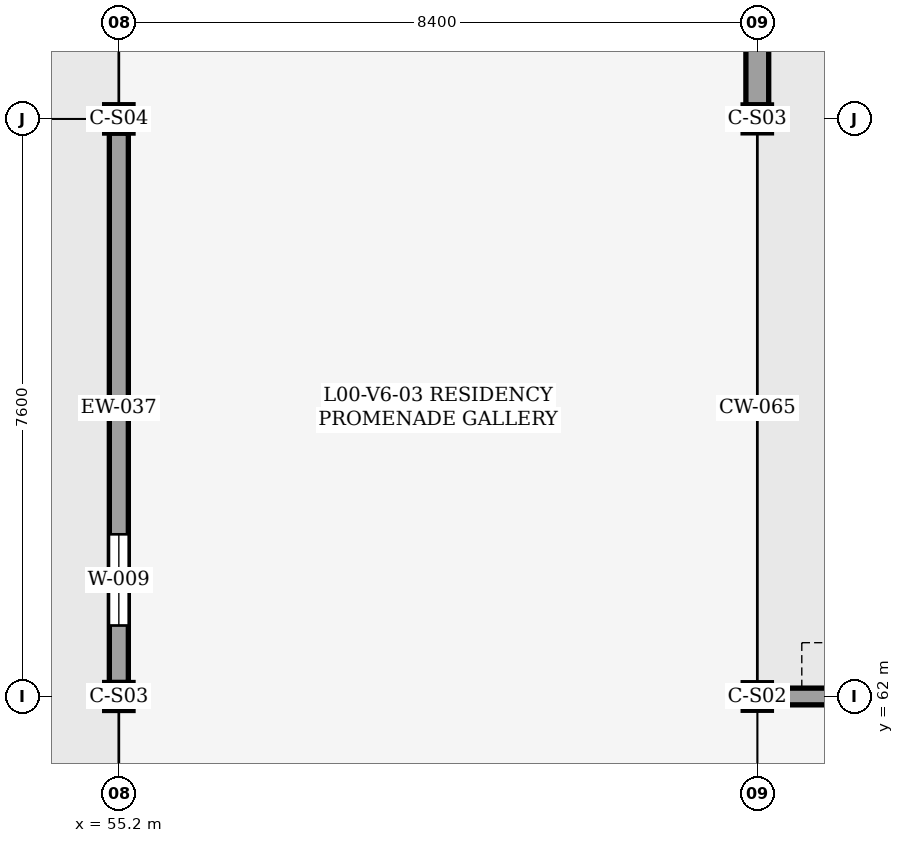
"""IFC4 building model, lengths in metres.
Left out: names, types, materials, properties, quantities, classifications, styles, units other than length and angle.
Written with IfcOpenShell. Run it as: python <this file> out.ifc"""

import sys

from ifc_helpers import new_model, si_unit, direction, frame, frame_2d, origin, origin_2d, place, context, subcontext, project, spatial, rectangle, i_section, extrude, element, fill, save


model = new_model("IFC4")
c1 = context("Model", 3, precision=1e-05, world=origin(), true_north=direction((0.0, 1.0)))
c2 = subcontext(c1, "Body", "Model", "MODEL_VIEW")
j1 = project(units=[si_unit("LENGTHUNIT", "METRE"), si_unit("PLANEANGLEUNIT", "RADIAN")], contexts=[c1])
p1 = place(None, origin())
s1 = spatial("IfcSite", under=j1, at=p1, CompositionType="ELEMENT")
p2 = place(p1, origin())
s2 = spatial("IfcBuilding", under=s1, at=p2, CompositionType="ELEMENT")
p3 = place(p2, origin())
s3 = spatial("IfcBuildingStorey", under=s2, at=p3, CompositionType="ELEMENT", Elevation=0.0)
p4 = place(p3, frame((55.2, 62.0, 0.0), z_axis=(0.0, 0.0, 1.0), x_axis=(1.0, 0.0, 0.0)))
e1 = element("IfcColumn", 1, at=p4, inside=s3, PredefinedType="COLUMN", context=c2, shape_type="SweptSolid", body=[
    extrude(i_section(OverallWidth=0.373, OverallDepth=0.368, WebThickness=0.015, FlangeThickness=0.024, FilletRadius=0.025, at=origin_2d()), origin(), (0.0, 0.0, 1.0), 5.4),
])
p5 = place(p3, frame((55.2, 69.6, 0.0), z_axis=(0.0, 0.0, 1.0), x_axis=(1.0, 0.0, 0.0)))
e2 = element("IfcColumn", 2, at=p5, inside=s3, PredefinedType="COLUMN", context=c2, shape_type="SweptSolid", body=[
    extrude(i_section(OverallWidth=0.373, OverallDepth=0.373, WebThickness=0.016, FlangeThickness=0.026, FilletRadius=0.025, at=origin_2d()), origin(), (0.0, 0.0, 1.0), 5.4),
])
p6 = place(p3, frame((63.6, 62.0, 0.0), z_axis=(0.0, 0.0, 1.0), x_axis=(1.0, 0.0, 0.0)))
e3 = element("IfcColumn", 3, at=p6, inside=s3, PredefinedType="COLUMN", context=c2, shape_type="SweptSolid", body=[
    extrude(i_section(OverallWidth=0.371, OverallDepth=0.363, WebThickness=0.013, FlangeThickness=0.022, FilletRadius=0.025, at=origin_2d()), origin(), (0.0, 0.0, 1.0), 5.4),
])
p7 = place(p3, frame((63.6, 69.6, 0.0), z_axis=(0.0, 0.0, 1.0), x_axis=(1.0, 0.0, 0.0)))
e4 = element("IfcColumn", 4, at=p7, inside=s3, PredefinedType="COLUMN", context=c2, shape_type="SweptSolid", body=[
    extrude(i_section(OverallWidth=0.373, OverallDepth=0.368, WebThickness=0.015, FlangeThickness=0.024, FilletRadius=0.025, at=origin_2d()), origin(), (0.0, 0.0, 1.0), 5.4),
])
p8 = place(p3, frame((63.785, 62.0, 0.0), z_axis=(0.0, 0.0, 1.0), x_axis=(1.0, 0.0, 0.0)))
e5 = element("IfcWall", 5, at=p8, inside=s3, PredefinedType="SOLIDWALL", context=c2, shape_type="SweptSolid", body=[
    extrude(rectangle(XDim=8.031, YDim=0.22, at=frame_2d((4.015, 0.0))), origin(), (0.0, 0.0, 1.0), 4.886),
])
p9 = place(p8, frame((2.915, 0.0, 0.0)))
e6 = element("IfcOpeningElement", 6, at=p9, cuts=e5, PredefinedType="OPENING", context=c2, shape_type="SweptSolid", body=[
    extrude(rectangle(XDim=2.2, YDim=2.4, at=frame_2d((1.1, 1.2))), frame((0.0, 0.12, 0.0), z_axis=(0.0, -1.0, 0.0), x_axis=(1.0, 0.0, 0.0)), (0.0, 0.0, 1.0), 0.24),
])
p10 = place(p3, frame((55.2, 62.184, 0.0), z_axis=(0.0, 0.0, 1.0), x_axis=(0.0, 1.0, 0.0)))
e7 = element("IfcWall", 7, at=p10, inside=s3, PredefinedType="SOLIDWALL", context=c2, shape_type="SweptSolid", body=[
    extrude(rectangle(XDim=7.229, YDim=0.25, at=frame_2d((3.615, 0.0))), origin(), (0.0, 0.0, 1.0), 4.533),
])
p11 = place(p10, frame((0.75, 0.0, 0.9)))
e8 = element("IfcOpeningElement", 8, at=p11, cuts=e7, PredefinedType="OPENING", context=c2, shape_type="SweptSolid", body=[
    extrude(rectangle(XDim=1.2, YDim=1.5, at=frame_2d((0.6, 0.75))), frame((0.0, 0.135, 0.0), z_axis=(0.0, -1.0, 0.0), x_axis=(1.0, 0.0, 0.0)), (0.0, 0.0, 1.0), 0.271),
])
p12 = place(p3, frame((63.6, 76.614, 0.0), z_axis=(0.0, 0.0, 1.0), x_axis=(0.0, -1.0, 0.0)))
e9 = element("IfcWall", 9, at=p12, inside=s3, PredefinedType="SOLIDWALL", context=c2, shape_type="SweptSolid", body=[
    extrude(rectangle(XDim=6.83, YDim=0.3, at=frame_2d((3.415, 0.0))), origin(), (0.0, 0.0, 1.0), 4.678),
])
p13 = place(p12, frame((0.75, 0.0, 0.9)))
e10 = element("IfcOpeningElement", 10, at=p13, cuts=e9, PredefinedType="OPENING", context=c2, shape_type="SweptSolid", body=[
    extrude(rectangle(XDim=1.2, YDim=1.5, at=frame_2d((0.6, 0.75))), frame((0.0, 0.16, 0.0), z_axis=(0.0, -1.0, 0.0), x_axis=(1.0, 0.0, 0.0)), (0.0, 0.0, 1.0), 0.321),
])
p14 = place(p11, origin())
e11 = element("IfcWindow", 11, at=p14, inside=s3, PartitioningType="SINGLE_PANEL", PredefinedType="WINDOW", context=c2, shape_type="SweptSolid", body=[
    extrude(rectangle(XDim=1.2, YDim=1.5, at=frame_2d((0.6, 0.75))), frame((0.0, 0.03, 0.0), z_axis=(0.0, -1.0, 0.0), x_axis=(1.0, 0.0, 0.0)), (0.0, 0.0, 1.0), 0.06),
])
fill(e8, e11)
save(model, sys.argv[1])
